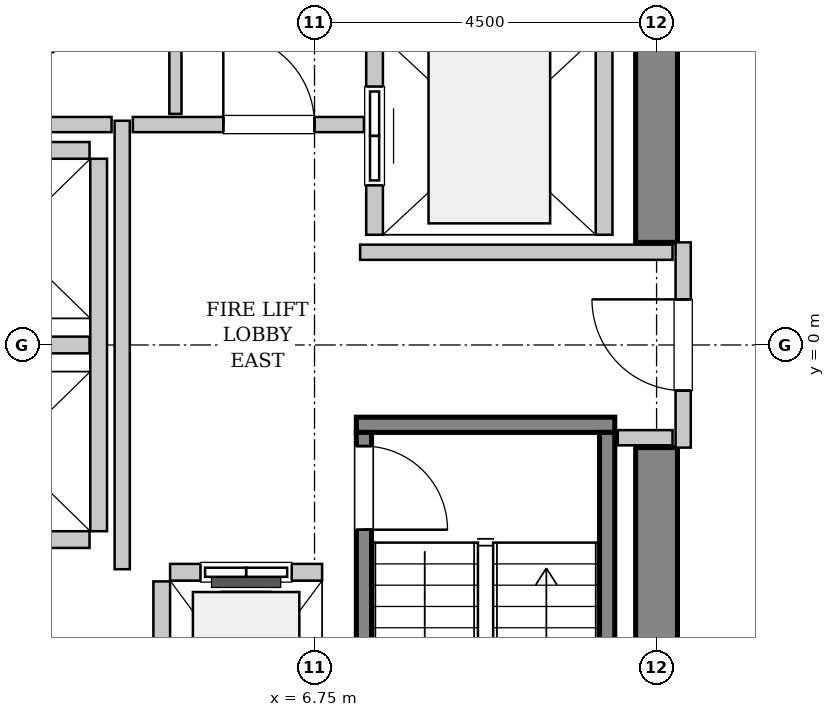
"""IFC4 building model, lengths in metres.
Left out: names, types, materials, properties, quantities, classifications, styles, units other than length and angle.
Written with IfcOpenShell. Run it as: python <this file> out.ifc"""

import sys

from ifc_helpers import new_model, si_unit, direction, frame, frame_2d, origin, place, context, subcontext, project, spatial, rectangle, extrude, source, transform, mapped, element, fill, save


model = new_model("IFC4")
c1 = context("Model", 3, precision=1e-05, world=origin(), true_north=direction((0.0, 1.0)))
c2 = subcontext(c1, "Body", "Model", "MODEL_VIEW")
j1 = project(units=[si_unit("LENGTHUNIT", "METRE"), si_unit("PLANEANGLEUNIT", "RADIAN")], contexts=[c1])
p1 = place(None, origin())
s1 = spatial("IfcSite", under=j1, at=p1, CompositionType="ELEMENT")
p2 = place(p1, origin())
s2 = spatial("IfcBuilding", under=s1, at=p2, CompositionType="ELEMENT")
p3 = place(p2, frame((0.0, 0.0, 198.2)))
s3 = spatial("IfcBuildingStorey", under=s2, at=p3, CompositionType="ELEMENT", Elevation=198.2)
m1 = source(origin(), c2, "Body", "SweptSolid", [
    extrude(rectangle(XDim=7.375, YDim=0.55, at=frame_2d((3.688, 0.0))), origin(), (0.0, 0.0, 1.0), 3.8),
])
for number, where, z_axis, x_axis in (
    (1, (11.25, -8.725, 0.0), (0.0, 0.0, 1.0), (0.0, 1.0, 0.0)),
    (2, (11.25, 1.35, 0.0), (0.0, 0.0, 1.0), (0.0, 1.0, 0.0)),
):
    element("IfcWall", number, at=place(p3, frame(where, z_axis=z_axis, x_axis=x_axis)), inside=s3, PredefinedType="SHEAR", context=c2, shape_type="MappedRepresentation", body=[
        mapped(m1, transform((0.0, 0.0, 0.0), x_axis=(1.0, 0.0, 0.0), y_axis=(0.0, 1.0, 0.0), z_axis=(0.0, 0.0, 1.0), scale=1.0)),
    ])
m2 = source(origin(), c2, "Body", "SweptSolid", [
    extrude(rectangle(XDim=3.4, YDim=0.2, at=frame_2d((1.7, 0.0))), origin(), (0.0, 0.0, 1.0), 3.8),
])
p4 = place(p3, frame((7.3, -1.05, 0.0), z_axis=(0.0, 0.0, 1.0), x_axis=(1.0, 0.0, 0.0)))
e3 = element("IfcWall", 3, at=p4, inside=s3, PredefinedType="SOLIDWALL", context=c2, shape_type="MappedRepresentation", body=[
    mapped(m2, transform((0.0, 0.0, 0.0), x_axis=(1.0, 0.0, 0.0), y_axis=(0.0, 1.0, 0.0), z_axis=(0.0, 0.0, 1.0), scale=1.0)),
])
m3 = source(origin(), c2, "Body", "SweptSolid", [
    extrude(rectangle(XDim=7.1, YDim=0.2, at=frame_2d((3.55, 0.0))), origin(), (0.0, 0.0, 1.0), 3.8),
])
p5 = place(p3, frame((7.4, -1.15, 0.0), z_axis=(0.0, 0.0, 1.0), x_axis=(0.0, -1.0, 0.0)))
e4 = element("IfcWall", 4, at=p5, inside=s3, PredefinedType="SOLIDWALL", context=c2, shape_type="MappedRepresentation", body=[
    mapped(m3, transform((0.0, 0.0, 0.0), x_axis=(1.0, 0.0, 0.0), y_axis=(0.0, 1.0, 0.0), z_axis=(0.0, 0.0, 1.0), scale=1.0)),
])
p6 = place(p5, frame((0.18, 0.0, 0.0)))
e5 = element("IfcOpeningElement", 5, at=p6, cuts=e4, PredefinedType="OPENING", context=c2, shape_type="SweptSolid", body=[
    extrude(rectangle(XDim=1.1, YDim=2.15, at=frame_2d((0.55, 1.075))), frame((0.0, 0.11, 0.0), z_axis=(0.0, -1.0, 0.0), x_axis=(1.0, 0.0, 0.0)), (0.0, 0.0, 1.0), 0.22),
])
p7 = place(p3, frame((10.6, -1.15, 0.0), z_axis=(0.0, 0.0, 1.0), x_axis=(0.0, -1.0, 0.0)))
e6 = element("IfcWall", 6, at=p7, inside=s3, PredefinedType="SOLIDWALL", context=c2, shape_type="MappedRepresentation", body=[
    mapped(m3, transform((0.0, 0.0, 0.0), x_axis=(1.0, 0.0, 0.0), y_axis=(0.0, 1.0, 0.0), z_axis=(0.0, 0.0, 1.0), scale=1.0)),
])
m4 = source(origin(), c2, "Body", "SweptSolid", [
    extrude(rectangle(XDim=2.0, YDim=0.22, at=frame_2d((1.0, 0.0))), origin(), (0.0, 0.0, 1.0), 3.485),
])
p8 = place(p3, frame((6.85, -2.99, 0.0), z_axis=(0.0, 0.0, 1.0), x_axis=(-1.0, 0.0, 0.0)))
e7 = element("IfcWall", 7, at=p8, inside=s3, PredefinedType="SOLIDWALL", context=c2, shape_type="MappedRepresentation", body=[
    mapped(m4, transform((0.0, 0.0, 0.0), x_axis=(1.0, 0.0, 0.0), y_axis=(0.0, 1.0, 0.0), z_axis=(0.0, 0.0, 1.0), scale=1.0)),
])
p9 = place(p8, frame((0.4, 0.0, 0.0)))
e8 = element("IfcOpeningElement", 8, at=p9, cuts=e7, PredefinedType="OPENING", context=c2, shape_type="SweptSolid", body=[
    extrude(rectangle(XDim=1.2, YDim=2.2, at=frame_2d((0.6, 1.1))), frame((0.0, 0.12, 0.0), z_axis=(0.0, -1.0, 0.0), x_axis=(1.0, 0.0, 0.0)), (0.0, 0.0, 1.0), 0.24),
])
m5 = source(origin(), c2, "Body", "SweptSolid", [
    extrude(rectangle(XDim=2.68, YDim=0.22, at=frame_2d((1.34, 0.0))), origin(), (0.0, 0.0, 1.0), 3.485),
])
p10 = place(p3, frame((4.74, -3.11, 0.0), z_axis=(0.0, 0.0, 1.0), x_axis=(0.0, -1.0, 0.0)))
e9 = element("IfcWall", 9, at=p10, inside=s3, PredefinedType="SOLIDWALL", context=c2, shape_type="MappedRepresentation", body=[
    mapped(m5, transform((0.0, 0.0, 0.0), x_axis=(1.0, 0.0, 0.0), y_axis=(0.0, 1.0, 0.0), z_axis=(0.0, 0.0, 1.0), scale=1.0)),
])
m6 = source(origin(), c2, "Body", "SweptSolid", [
    extrude(rectangle(XDim=5.45, YDim=0.22, at=frame_2d((2.725, 0.0))), origin(), (0.0, 0.0, 1.0), 3.485),
])
p11 = place(p3, frame((7.54, 6.9, 0.0), z_axis=(0.0, 0.0, 1.0), x_axis=(0.0, -1.0, 0.0)))
e10 = element("IfcWall", 10, at=p11, inside=s3, PredefinedType="SOLIDWALL", context=c2, shape_type="MappedRepresentation", body=[
    mapped(m6, transform((0.0, 0.0, 0.0), x_axis=(1.0, 0.0, 0.0), y_axis=(0.0, 1.0, 0.0), z_axis=(0.0, 0.0, 1.0), scale=1.0)),
])
p12 = place(p11, frame((3.5, 0.0, 0.0)))
e11 = element("IfcOpeningElement", 11, at=p12, cuts=e10, PredefinedType="OPENING", context=c2, shape_type="SweptSolid", body=[
    extrude(rectangle(XDim=1.3, YDim=2.3, at=frame_2d((0.65, 1.15))), frame((0.0, 0.12, 0.0), z_axis=(0.0, -1.0, 0.0), x_axis=(1.0, 0.0, 0.0)), (0.0, 0.0, 1.0), 0.24),
])
p13 = place(p11, frame((0.65, 0.0, 0.0)))
e12 = element("IfcOpeningElement", 12, at=p13, cuts=e10, PredefinedType="OPENING", context=c2, shape_type="SweptSolid", body=[
    extrude(rectangle(XDim=1.3, YDim=2.3, at=frame_2d((0.65, 1.15))), frame((0.0, 0.12, 0.0), z_axis=(0.0, -1.0, 0.0), x_axis=(1.0, 0.0, 0.0)), (0.0, 0.0, 1.0), 0.24),
])
p14 = place(p3, frame((10.56, 1.45, 0.0), z_axis=(0.0, 0.0, 1.0), x_axis=(0.0, 1.0, 0.0)))
e13 = element("IfcWall", 13, at=p14, inside=s3, PredefinedType="SOLIDWALL", context=c2, shape_type="MappedRepresentation", body=[
    mapped(m6, transform((0.0, 0.0, 0.0), x_axis=(1.0, 0.0, 0.0), y_axis=(0.0, 1.0, 0.0), z_axis=(0.0, 0.0, 1.0), scale=1.0)),
])
m7 = source(origin(), c2, "Body", "SweptSolid", [
    extrude(rectangle(XDim=4.9, YDim=0.22, at=frame_2d((2.45, 0.0))), origin(), (0.0, 0.0, 1.0), 3.485),
])
p15 = place(p3, frame((3.91, -2.45, 0.0), z_axis=(0.0, 0.0, 1.0), x_axis=(0.0, 1.0, 0.0)))
e14 = element("IfcWall", 14, at=p15, inside=s3, PredefinedType="SOLIDWALL", context=c2, shape_type="MappedRepresentation", body=[
    mapped(m7, transform((0.0, 0.0, 0.0), x_axis=(1.0, 0.0, 0.0), y_axis=(0.0, 1.0, 0.0), z_axis=(0.0, 0.0, 1.0), scale=1.0)),
])
m8 = source(origin(), c2, "Body", "SweptSolid", [
    extrude(rectangle(XDim=2.13, YDim=0.22, at=frame_2d((1.065, 0.0))), origin(), (0.0, 0.0, 1.0), 3.485),
])
for number, where, z_axis, x_axis in (
    (15, (1.66, -2.56, 0.0), (0.0, 0.0, 1.0), (1.0, 0.0, 0.0)),
    (16, (1.66, 0.0, 0.0), (0.0, 0.0, 1.0), (1.0, 0.0, 0.0)),
    (17, (3.79, 2.56, 0.0), (0.0, 0.0, 1.0), (-1.0, 0.0, 0.0)),
):
    element("IfcWall", number, at=place(p3, frame(where, z_axis=z_axis, x_axis=x_axis)), inside=s3, PredefinedType="SOLIDWALL", context=c2, shape_type="MappedRepresentation", body=[
        mapped(m8, transform((0.0, 0.0, 0.0), x_axis=(1.0, 0.0, 0.0), y_axis=(0.0, 1.0, 0.0), z_axis=(0.0, 0.0, 1.0), scale=1.0)),
    ])
m9 = source(origin(), c2, "Body", "SweptSolid", [
    extrude(rectangle(XDim=2.7, YDim=0.2, at=frame_2d((1.35, 0.0))), origin(), (0.0, 0.0, 1.0), 2.375),
])
p16 = place(p3, frame((11.6, -1.35, 0.0), z_axis=(0.0, 0.0, 1.0), x_axis=(0.0, 1.0, 0.0)))
e18 = element("IfcWall", 18, at=p16, inside=s3, PredefinedType="PARTITIONING", context=c2, shape_type="MappedRepresentation", body=[
    mapped(m9, transform((0.0, 0.0, 0.0), x_axis=(1.0, 0.0, 0.0), y_axis=(0.0, 1.0, 0.0), z_axis=(0.0, 0.0, 1.0), scale=1.0)),
])
p17 = place(p16, frame((0.75, 0.0, 0.0)))
e19 = element("IfcOpeningElement", 19, at=p17, cuts=e18, PredefinedType="OPENING", context=c2, shape_type="SweptSolid", body=[
    extrude(rectangle(XDim=1.2, YDim=2.15, at=frame_2d((0.6, 1.075))), frame((0.0, 0.11, 0.0), z_axis=(0.0, -1.0, 0.0), x_axis=(1.0, 0.0, 0.0)), (0.0, 0.0, 1.0), 0.22),
])
m10 = source(origin(), c2, "Body", "SweptSolid", [
    extrude(rectangle(XDim=5.9, YDim=0.2, at=frame_2d((2.95, 0.0))), origin(), (0.0, 0.0, 1.0), 3.485),
])
p18 = place(p3, frame((4.22, -2.95, 0.0), z_axis=(0.0, 0.0, 1.0), x_axis=(0.0, 1.0, 0.0)))
e20 = element("IfcWall", 20, at=p18, inside=s3, PredefinedType="PARTITIONING", context=c2, shape_type="MappedRepresentation", body=[
    mapped(m10, transform((0.0, 0.0, 0.0), x_axis=(1.0, 0.0, 0.0), y_axis=(0.0, 1.0, 0.0), z_axis=(0.0, 0.0, 1.0), scale=1.0)),
])
m11 = source(origin(), c2, "Body", "SweptSolid", [
    extrude(rectangle(XDim=2.52, YDim=0.2, at=frame_2d((1.26, 0.0))), origin(), (0.0, 0.0, 1.0), 3.485),
])
p19 = place(p3, frame((1.56, 2.9, 0.0), z_axis=(0.0, 0.0, 1.0), x_axis=(1.0, 0.0, 0.0)))
e21 = element("IfcWall", 21, at=p19, inside=s3, PredefinedType="PARTITIONING", context=c2, shape_type="MappedRepresentation", body=[
    mapped(m11, transform((0.0, 0.0, 0.0), x_axis=(1.0, 0.0, 0.0), y_axis=(0.0, 1.0, 0.0), z_axis=(0.0, 0.0, 1.0), scale=1.0)),
])
m12 = source(origin(), c2, "Body", "SweptSolid", [
    extrude(rectangle(XDim=3.04, YDim=0.2, at=frame_2d((1.52, 0.0))), origin(), (0.0, 0.0, 1.0), 3.485),
])
p20 = place(p3, frame((4.36, 2.9, 0.0), z_axis=(0.0, 0.0, 1.0), x_axis=(1.0, 0.0, 0.0)))
e22 = element("IfcWall", 22, at=p20, inside=s3, PredefinedType="PARTITIONING", context=c2, shape_type="MappedRepresentation", body=[
    mapped(m12, transform((0.0, 0.0, 0.0), x_axis=(1.0, 0.0, 0.0), y_axis=(0.0, 1.0, 0.0), z_axis=(0.0, 0.0, 1.0), scale=1.0)),
])
p21 = place(p20, frame((1.19, 0.0, 0.0)))
e23 = element("IfcOpeningElement", 23, at=p21, cuts=e22, PredefinedType="OPENING", context=c2, shape_type="SweptSolid", body=[
    extrude(rectangle(XDim=1.2, YDim=2.15, at=frame_2d((0.6, 1.075))), frame((0.0, 0.11, 0.0), z_axis=(0.0, -1.0, 0.0), x_axis=(1.0, 0.0, 0.0)), (0.0, 0.0, 1.0), 0.22),
])
m13 = source(origin(), c2, "Body", "SweptSolid", [
    extrude(rectangle(XDim=4.11, YDim=0.2, at=frame_2d((2.055, 0.0))), origin(), (0.0, 0.0, 1.0), 3.485),
])
p22 = place(p3, frame((7.35, 1.22, 0.0), z_axis=(0.0, 0.0, 1.0), x_axis=(1.0, 0.0, 0.0)))
e24 = element("IfcWall", 24, at=p22, inside=s3, PredefinedType="PARTITIONING", context=c2, shape_type="MappedRepresentation", body=[
    mapped(m13, transform((0.0, 0.0, 0.0), x_axis=(1.0, 0.0, 0.0), y_axis=(0.0, 1.0, 0.0), z_axis=(0.0, 0.0, 1.0), scale=1.0)),
])
m14 = source(origin(), c2, "Body", "SweptSolid", [
    extrude(rectangle(XDim=0.72, YDim=0.2, at=frame_2d((0.36, 0.0))), origin(), (0.0, 0.0, 1.0), 3.485),
])
p23 = place(p3, frame((10.74, -1.22, 0.0), z_axis=(0.0, 0.0, 1.0), x_axis=(1.0, 0.0, 0.0)))
e25 = element("IfcWall", 25, at=p23, inside=s3, PredefinedType="PARTITIONING", context=c2, shape_type="MappedRepresentation", body=[
    mapped(m14, transform((0.0, 0.0, 0.0), x_axis=(1.0, 0.0, 0.0), y_axis=(0.0, 1.0, 0.0), z_axis=(0.0, 0.0, 1.0), scale=1.0)),
])
m15 = source(origin(), c2, "Body", "SweptSolid", [
    extrude(rectangle(XDim=5.45, YDim=0.16, at=frame_2d((2.725, 0.0))), origin(), (0.0, 0.0, 1.0), 3.485),
])
p24 = place(p3, frame((4.92, 3.04, 0.0), z_axis=(0.0, 0.0, 1.0), x_axis=(0.0, 1.0, 0.0)))
e26 = element("IfcWall", 26, at=p24, inside=s3, PredefinedType="PARTITIONING", context=c2, shape_type="MappedRepresentation", body=[
    mapped(m15, transform((0.0, 0.0, 0.0), x_axis=(1.0, 0.0, 0.0), y_axis=(0.0, 1.0, 0.0), z_axis=(0.0, 0.0, 1.0), scale=1.0)),
])
m16 = source(origin(), c2, "Body", "SweptSolid", [
    extrude(rectangle(XDim=1.1, YDim=2.15, at=frame_2d((0.55, 1.075))), frame((0.0, 0.025, 0.0), z_axis=(0.0, -1.0, 0.0), x_axis=(1.0, 0.0, 0.0)), (0.0, 0.0, 1.0), 0.05),
])
p25 = place(p6, origin())
e27 = element("IfcDoor", 27, at=p25, inside=s3, OperationType="SINGLE_SWING_RIGHT", PredefinedType="DOOR", context=c2, shape_type="MappedRepresentation", body=[
    mapped(m16, transform((0.0, 0.0, 0.0), x_axis=(1.0, 0.0, 0.0), y_axis=(0.0, 1.0, 0.0), z_axis=(0.0, 0.0, 1.0), scale=1.0)),
])
fill(e5, e27)
m17 = source(origin(), c2, "Body", "SweptSolid", [
    extrude(rectangle(XDim=1.2, YDim=2.2, at=frame_2d((0.6, 1.1))), frame((0.0, 0.025, 0.0), z_axis=(0.0, -1.0, 0.0), x_axis=(1.0, 0.0, 0.0)), (0.0, 0.0, 1.0), 0.05),
])
p26 = place(p9, origin())
e28 = element("IfcDoor", 28, at=p26, inside=s3, OperationType="SLIDING_TO_LEFT", PredefinedType="DOOR", context=c2, shape_type="MappedRepresentation", body=[
    mapped(m17, transform((0.0, 0.0, 0.0), x_axis=(1.0, 0.0, 0.0), y_axis=(0.0, 1.0, 0.0), z_axis=(0.0, 0.0, 1.0), scale=1.0)),
])
fill(e8, e28)
m18 = source(origin(), c2, "Body", "SweptSolid", [
    extrude(rectangle(XDim=1.3, YDim=2.3, at=frame_2d((0.65, 1.15))), frame((0.0, 0.025, 0.0), z_axis=(0.0, -1.0, 0.0), x_axis=(1.0, 0.0, 0.0)), (0.0, 0.0, 1.0), 0.05),
])
p27 = place(p12, origin())
e29 = element("IfcDoor", 29, at=p27, inside=s3, OperationType="SLIDING_TO_RIGHT", PredefinedType="DOOR", context=c2, shape_type="MappedRepresentation", body=[
    mapped(m18, transform((0.0, 0.0, 0.0), x_axis=(1.0, 0.0, 0.0), y_axis=(0.0, 1.0, 0.0), z_axis=(0.0, 0.0, 1.0), scale=1.0)),
])
fill(e11, e29)
m19 = source(origin(), c2, "Body", "SweptSolid", [
    extrude(rectangle(XDim=1.2, YDim=2.15, at=frame_2d((0.6, 1.075))), frame((0.0, 0.025, 0.0), z_axis=(0.0, -1.0, 0.0), x_axis=(1.0, 0.0, 0.0)), (0.0, 0.0, 1.0), 0.05),
])
p28 = place(p17, origin())
e30 = element("IfcDoor", 30, at=p28, inside=s3, OperationType="SINGLE_SWING_RIGHT", PredefinedType="DOOR", context=c2, shape_type="MappedRepresentation", body=[
    mapped(m19, transform((0.0, 0.0, 0.0), x_axis=(1.0, 0.0, 0.0), y_axis=(0.0, 1.0, 0.0), z_axis=(0.0, 0.0, 1.0), scale=1.0)),
])
fill(e19, e30)
p29 = place(p21, origin())
e31 = element("IfcDoor", 31, at=p29, inside=s3, OperationType="SINGLE_SWING_LEFT", PredefinedType="DOOR", context=c2, shape_type="MappedRepresentation", body=[
    mapped(m19, transform((0.0, 0.0, 0.0), x_axis=(1.0, 0.0, 0.0), y_axis=(0.0, 1.0, 0.0), z_axis=(0.0, 0.0, 1.0), scale=1.0)),
])
fill(e23, e31)
save(model, sys.argv[1])
